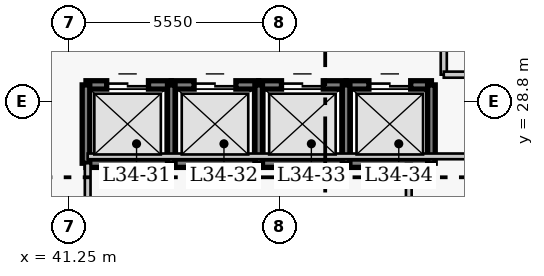
"""IFC4 building model, lengths in metres.
Left out: names, types, materials, properties, quantities, classifications, styles, units other than length and angle.
Written with IfcOpenShell. Run it as: python <this file> out.ifc"""

import sys

from ifc_helpers import new_model, si_unit, direction, frame, frame_2d, origin, place, context, subcontext, project, spatial, rectangle, extrude, element, fill, save


model = new_model("IFC4")
c1 = context("Model", 3, precision=1e-05, world=origin(), true_north=direction((0.0, 1.0)))
c2 = subcontext(c1, "Body", "Model", "MODEL_VIEW")
j1 = project(units=[si_unit("LENGTHUNIT", "METRE"), si_unit("PLANEANGLEUNIT", "RADIAN")], contexts=[c1])
p1 = place(None, origin())
s1 = spatial("IfcSite", under=j1, at=p1, CompositionType="ELEMENT")
p2 = place(p1, origin())
s2 = spatial("IfcBuilding", under=s1, at=p2, CompositionType="ELEMENT")
p3 = place(p2, frame((0.0, 0.0, 138.4)))
s3 = spatial("IfcBuildingStorey", under=s2, at=p3, CompositionType="ELEMENT", Elevation=138.4)
p4 = place(p3, frame((41.705, 29.23, 0.0), z_axis=(0.0, 0.0, 1.0), x_axis=(1.0, 0.0, 0.0)))
e1 = element("IfcWall", 1, at=p4, inside=s3, PredefinedType="SHEAR", context=c2, shape_type="SweptSolid", body=[
    extrude(rectangle(XDim=2.245, YDim=0.22, at=frame_2d((1.123, 0.0))), origin(), (0.0, 0.0, 1.0), 3.8),
])
p5 = place(p4, frame((0.545, 0.0, 0.0)))
e2 = element("IfcOpeningElement", 2, at=p5, cuts=e1, PredefinedType="OPENING", context=c2, shape_type="SweptSolid", body=[
    extrude(rectangle(XDim=1.1, YDim=2.15, at=frame_2d((0.55, 1.075))), frame((0.0, 0.12, 0.0), z_axis=(0.0, -1.0, 0.0), x_axis=(1.0, 0.0, 0.0)), (0.0, 0.0, 1.0), 0.24),
])
p6 = place(p3, frame((41.705, 27.17, 0.0), z_axis=(0.0, 0.0, 1.0), x_axis=(1.0, 0.0, 0.0)))
e3 = element("IfcWall", 3, at=p6, inside=s3, PredefinedType="SHEAR", context=c2, shape_type="SweptSolid", body=[
    extrude(rectangle(XDim=2.245, YDim=0.22, at=frame_2d((1.123, 0.0))), origin(), (0.0, 0.0, 1.0), 3.8),
])
p7 = place(p3, frame((41.705, 27.17, 0.0), z_axis=(0.0, 0.0, 1.0), x_axis=(0.0, 1.0, 0.0)))
e4 = element("IfcWall", 4, at=p7, inside=s3, PredefinedType="SHEAR", context=c2, shape_type="SweptSolid", body=[
    extrude(rectangle(XDim=2.06, YDim=0.2, at=frame_2d((1.03, 0.0))), origin(), (0.0, 0.0, 1.0), 3.8),
])
p8 = place(p3, frame((43.95, 29.23, 0.0), z_axis=(0.0, 0.0, 1.0), x_axis=(1.0, 0.0, 0.0)))
e5 = element("IfcWall", 5, at=p8, inside=s3, PredefinedType="SHEAR", context=c2, shape_type="SweptSolid", body=[
    extrude(rectangle(XDim=2.3, YDim=0.22, at=frame_2d((1.15, 0.0))), origin(), (0.0, 0.0, 1.0), 3.8),
])
p9 = place(p8, frame((0.6, 0.0, 0.0)))
e6 = element("IfcOpeningElement", 6, at=p9, cuts=e5, PredefinedType="OPENING", context=c2, shape_type="SweptSolid", body=[
    extrude(rectangle(XDim=1.1, YDim=2.15, at=frame_2d((0.55, 1.075))), frame((0.0, 0.12, 0.0), z_axis=(0.0, -1.0, 0.0), x_axis=(1.0, 0.0, 0.0)), (0.0, 0.0, 1.0), 0.24),
])
p10 = place(p3, frame((43.95, 27.17, 0.0), z_axis=(0.0, 0.0, 1.0), x_axis=(1.0, 0.0, 0.0)))
e7 = element("IfcWall", 7, at=p10, inside=s3, PredefinedType="SHEAR", context=c2, shape_type="SweptSolid", body=[
    extrude(rectangle(XDim=2.3, YDim=0.22, at=frame_2d((1.15, 0.0))), origin(), (0.0, 0.0, 1.0), 3.8),
])
p11 = place(p3, frame((43.95, 27.17, 0.0), z_axis=(0.0, 0.0, 1.0), x_axis=(0.0, 1.0, 0.0)))
e8 = element("IfcWall", 8, at=p11, inside=s3, PredefinedType="SHEAR", context=c2, shape_type="SweptSolid", body=[
    extrude(rectangle(XDim=2.06, YDim=0.2, at=frame_2d((1.03, 0.0))), origin(), (0.0, 0.0, 1.0), 3.8),
])
p12 = place(p3, frame((46.25, 29.23, 0.0), z_axis=(0.0, 0.0, 1.0), x_axis=(1.0, 0.0, 0.0)))
e9 = element("IfcWall", 9, at=p12, inside=s3, PredefinedType="SHEAR", context=c2, shape_type="SweptSolid", body=[
    extrude(rectangle(XDim=2.3, YDim=0.22, at=frame_2d((1.15, 0.0))), origin(), (0.0, 0.0, 1.0), 3.8),
])
p13 = place(p12, frame((0.6, 0.0, 0.0)))
e10 = element("IfcOpeningElement", 10, at=p13, cuts=e9, PredefinedType="OPENING", context=c2, shape_type="SweptSolid", body=[
    extrude(rectangle(XDim=1.1, YDim=2.15, at=frame_2d((0.55, 1.075))), frame((0.0, 0.12, 0.0), z_axis=(0.0, -1.0, 0.0), x_axis=(1.0, 0.0, 0.0)), (0.0, 0.0, 1.0), 0.24),
])
p14 = place(p3, frame((46.25, 27.17, 0.0), z_axis=(0.0, 0.0, 1.0), x_axis=(1.0, 0.0, 0.0)))
e11 = element("IfcWall", 11, at=p14, inside=s3, PredefinedType="SHEAR", context=c2, shape_type="SweptSolid", body=[
    extrude(rectangle(XDim=2.3, YDim=0.22, at=frame_2d((1.15, 0.0))), origin(), (0.0, 0.0, 1.0), 3.8),
])
p15 = place(p3, frame((46.25, 27.17, 0.0), z_axis=(0.0, 0.0, 1.0), x_axis=(0.0, 1.0, 0.0)))
e12 = element("IfcWall", 12, at=p15, inside=s3, PredefinedType="SHEAR", context=c2, shape_type="SweptSolid", body=[
    extrude(rectangle(XDim=2.06, YDim=0.2, at=frame_2d((1.03, 0.0))), origin(), (0.0, 0.0, 1.0), 3.8),
])
p16 = place(p3, frame((48.55, 29.23, 0.0), z_axis=(0.0, 0.0, 1.0), x_axis=(1.0, 0.0, 0.0)))
e13 = element("IfcWall", 13, at=p16, inside=s3, PredefinedType="SHEAR", context=c2, shape_type="SweptSolid", body=[
    extrude(rectangle(XDim=2.245, YDim=0.22, at=frame_2d((1.123, 0.0))), origin(), (0.0, 0.0, 1.0), 3.8),
])
p17 = place(p16, frame((0.6, 0.0, 0.0)))
e14 = element("IfcOpeningElement", 14, at=p17, cuts=e13, PredefinedType="OPENING", context=c2, shape_type="SweptSolid", body=[
    extrude(rectangle(XDim=1.1, YDim=2.15, at=frame_2d((0.55, 1.075))), frame((0.0, 0.12, 0.0), z_axis=(0.0, -1.0, 0.0), x_axis=(1.0, 0.0, 0.0)), (0.0, 0.0, 1.0), 0.24),
])
p18 = place(p3, frame((48.55, 27.17, 0.0), z_axis=(0.0, 0.0, 1.0), x_axis=(1.0, 0.0, 0.0)))
e15 = element("IfcWall", 15, at=p18, inside=s3, PredefinedType="SHEAR", context=c2, shape_type="SweptSolid", body=[
    extrude(rectangle(XDim=2.245, YDim=0.22, at=frame_2d((1.123, 0.0))), origin(), (0.0, 0.0, 1.0), 3.8),
])
for number, where, z_axis, x_axis in (
    (16, (48.55, 27.17, 0.0), (0.0, 0.0, 1.0), (0.0, 1.0, 0.0)),
    (17, (50.795, 27.17, 0.0), (0.0, 0.0, 1.0), (0.0, 1.0, 0.0)),
):
    element("IfcWall", number, at=place(p3, frame(where, z_axis=z_axis, x_axis=x_axis)), inside=s3, PredefinedType="SHEAR", context=c2, shape_type="SweptSolid", body=[
        extrude(rectangle(XDim=2.06, YDim=0.2, at=frame_2d((1.03, 0.0))), origin(), (0.0, 0.0, 1.0), 3.8),
    ])
p19 = place(p3, frame((51.12, 29.5, 0.0), z_axis=(0.0, 0.0, 1.0), x_axis=(0.0, 1.0, 0.0)))
e18 = element("IfcWall", 18, at=p19, inside=s3, PredefinedType="PARTITIONING", context=c2, shape_type="SweptSolid", body=[
    extrude(rectangle(XDim=3.7, YDim=0.16, at=frame_2d((1.85, 0.0))), origin(), (0.0, 0.0, 1.0), 3.55),
])
p20 = place(p19, frame((0.9, 0.0, 0.0)))
e19 = element("IfcOpeningElement", 19, at=p20, cuts=e18, PredefinedType="OPENING", context=c2, shape_type="SweptSolid", body=[
    extrude(rectangle(XDim=1.1, YDim=2.15, at=frame_2d((0.55, 1.075))), frame((0.0, 0.09, 0.0), z_axis=(0.0, -1.0, 0.0), x_axis=(1.0, 0.0, 0.0)), (0.0, 0.0, 1.0), 0.18),
])
p21 = place(p3, frame((51.12, 29.5, 0.0), z_axis=(0.0, 0.0, 1.0), x_axis=(1.0, 0.0, 0.0)))
e20 = element("IfcWall", 20, at=p21, inside=s3, PredefinedType="PARTITIONING", context=c2, shape_type="SweptSolid", body=[
    extrude(rectangle(XDim=5.63, YDim=0.16, at=frame_2d((2.815, 0.0))), origin(), (0.0, 0.0, 1.0), 3.55),
])
p22 = place(p3, frame((41.75, 19.01, 0.0), z_axis=(0.0, 0.0, 1.0), x_axis=(0.0, 1.0, 0.0)))
e21 = element("IfcWall", 21, at=p22, inside=s3, PredefinedType="PARTITIONING", context=c2, shape_type="SweptSolid", body=[
    extrude(rectangle(XDim=8.16, YDim=0.15, at=frame_2d((4.08, 0.0))), origin(), (0.0, 0.0, 1.0), 3.55),
])
p23 = place(p3, frame((50.2, 19.01, 0.0), z_axis=(0.0, 0.0, 1.0), x_axis=(0.0, 1.0, 0.0)))
e22 = element("IfcWall", 22, at=p23, inside=s3, PredefinedType="PARTITIONING", context=c2, shape_type="SweptSolid", body=[
    extrude(rectangle(XDim=8.14, YDim=0.15, at=frame_2d((4.07, 0.0))), origin(), (0.0, 0.0, 1.0), 3.55),
])
p24 = place(p3, frame((41.75, 27.35, 0.0), z_axis=(0.0, 0.0, 1.0), x_axis=(1.0, 0.0, 0.0)))
e23 = element("IfcWall", 23, at=p24, inside=s3, PredefinedType="PARTITIONING", context=c2, shape_type="SweptSolid", body=[
    extrude(rectangle(XDim=17.19, YDim=0.15, at=frame_2d((8.595, 0.0))), origin(), (0.0, 0.0, 1.0), 3.55),
])
p25 = place(p5, origin())
e24 = element("IfcDoor", 24, at=p25, inside=s3, OperationType="DOUBLE_DOOR_SLIDING", PredefinedType="DOOR", context=c2, shape_type="SweptSolid", body=[
    extrude(rectangle(XDim=1.1, YDim=2.15, at=frame_2d((0.55, 1.075))), frame((0.0, 0.025, 0.0), z_axis=(0.0, -1.0, 0.0), x_axis=(1.0, 0.0, 0.0)), (0.0, 0.0, 1.0), 0.05),
])
fill(e2, e24)
p26 = place(p9, origin())
e25 = element("IfcDoor", 25, at=p26, inside=s3, OperationType="DOUBLE_DOOR_SLIDING", PredefinedType="DOOR", context=c2, shape_type="SweptSolid", body=[
    extrude(rectangle(XDim=1.1, YDim=2.15, at=frame_2d((0.55, 1.075))), frame((0.0, 0.025, 0.0), z_axis=(0.0, -1.0, 0.0), x_axis=(1.0, 0.0, 0.0)), (0.0, 0.0, 1.0), 0.05),
])
fill(e6, e25)
p27 = place(p13, origin())
e26 = element("IfcDoor", 26, at=p27, inside=s3, OperationType="DOUBLE_DOOR_SLIDING", PredefinedType="DOOR", context=c2, shape_type="SweptSolid", body=[
    extrude(rectangle(XDim=1.1, YDim=2.15, at=frame_2d((0.55, 1.075))), frame((0.0, 0.025, 0.0), z_axis=(0.0, -1.0, 0.0), x_axis=(1.0, 0.0, 0.0)), (0.0, 0.0, 1.0), 0.05),
])
fill(e10, e26)
p28 = place(p17, origin())
e27 = element("IfcDoor", 27, at=p28, inside=s3, OperationType="DOUBLE_DOOR_SLIDING", PredefinedType="DOOR", context=c2, shape_type="SweptSolid", body=[
    extrude(rectangle(XDim=1.1, YDim=2.15, at=frame_2d((0.55, 1.075))), frame((0.0, 0.025, 0.0), z_axis=(0.0, -1.0, 0.0), x_axis=(1.0, 0.0, 0.0)), (0.0, 0.0, 1.0), 0.05),
])
fill(e14, e27)
save(model, sys.argv[1])
